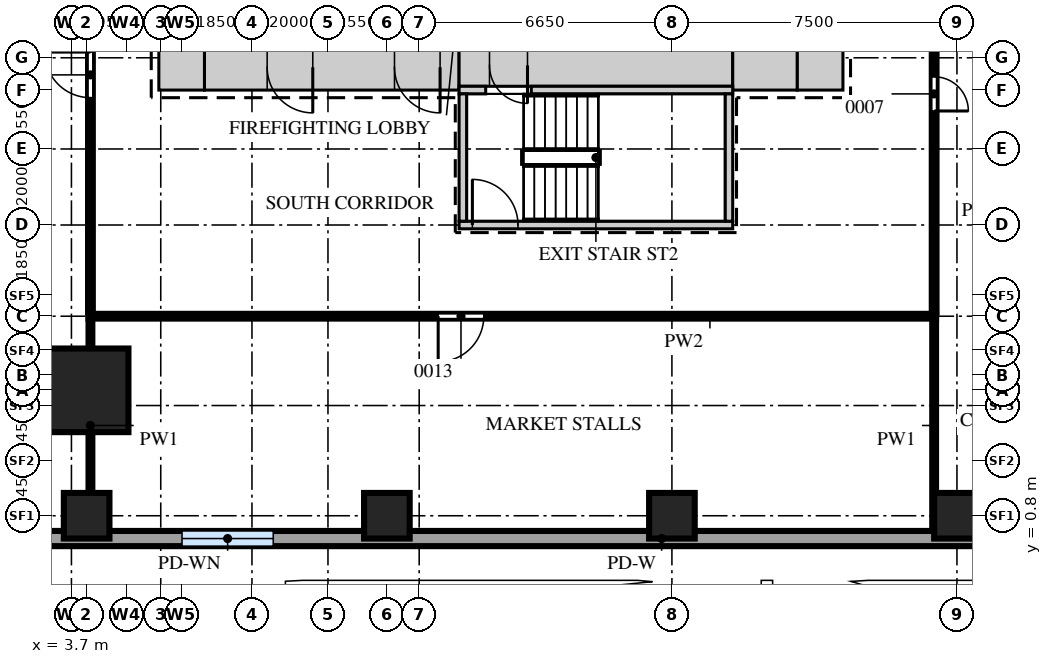
"""IFC4 building model, lengths in metres.
Left out: names, types, materials, properties, quantities, classifications, styles, units other than length and angle.
Written with IfcOpenShell. Run it as: python <this file> out.ifc"""

import sys

from ifc_helpers import new_model, si_unit, direction, frame, frame_2d, origin, origin_2d, place, context, subcontext, project, spatial, rectangle, extrude, source, transform, mapped, element, fill, save


model = new_model("IFC4")
c1 = context("Model", 3, precision=1e-05, world=origin(), true_north=direction((0.0, 1.0)))
c2 = subcontext(c1, "Body", "Model", "MODEL_VIEW")
j1 = project(units=[si_unit("LENGTHUNIT", "METRE"), si_unit("PLANEANGLEUNIT", "RADIAN")], contexts=[c1])
p1 = place(None, origin())
s1 = spatial("IfcSite", under=j1, at=p1, CompositionType="ELEMENT")
p2 = place(p1, origin())
s2 = spatial("IfcBuilding", under=s1, at=p2, CompositionType="ELEMENT")
p3 = place(p2, frame((0.0, 0.0, 7.5)))
s3 = spatial("IfcBuildingStorey", under=s2, at=p3, CompositionType="ELEMENT", Elevation=7.5)
m1 = source(origin(), c2, "Body", "SweptSolid", [
    extrude(rectangle(XDim=6.7, YDim=1.2, at=frame_2d((3.35, 0.0))), origin(), (0.0, 0.0, 1.0), 5.2),
])
p4 = place(p3, frame((7.2, 12.6, 0.0), z_axis=(0.0, 0.0, 1.0), x_axis=(1.0, 0.0, 0.0)))
e1 = element("IfcWall", 1, at=p4, inside=s3, PredefinedType="SHEAR", context=c2, shape_type="MappedRepresentation", body=[
    mapped(m1, transform((0.0, 0.0, 0.0))),
])
m2 = source(origin(), c2, "Body", "SweptSolid", [
    extrude(rectangle(XDim=1.2, YDim=2.1, at=frame_2d((0.6, 1.05))), frame((0.0, 0.61, 0.0), z_axis=(0.0, -1.0, 0.0), x_axis=(1.0, 0.0, 0.0)), (0.0, 0.0, 1.0), 1.22),
])
p5 = place(p4, frame((5.0, 0.0, 0.0)))
e2 = element("IfcOpeningElement", 2, at=p5, cuts=e1, PredefinedType="OPENING", context=c2, shape_type="MappedRepresentation", body=[
    mapped(m2, transform((0.0, 0.0, 0.0))),
])
p6 = place(p4, frame((1.65, 0.0, 0.0)))
e3 = element("IfcOpeningElement", 3, at=p6, cuts=e1, PredefinedType="OPENING", context=c2, shape_type="MappedRepresentation", body=[
    mapped(m2, transform((0.0, 0.0, 0.0))),
])
m3 = source(origin(), c2, "Body", "SweptSolid", [
    extrude(rectangle(XDim=7.2, YDim=1.1, at=frame_2d((3.6, 0.0))), origin(), (0.0, 0.0, 1.0), 5.2),
])
p7 = place(p3, frame((13.9, 12.65, 0.0), z_axis=(0.0, 0.0, 1.0), x_axis=(1.0, 0.0, 0.0)))
e4 = element("IfcWall", 4, at=p7, inside=s3, PredefinedType="SHEAR", context=c2, shape_type="MappedRepresentation", body=[
    mapped(m3, transform((0.0, 0.0, 0.0))),
])
m4 = source(origin(), c2, "Body", "SweptSolid", [
    extrude(rectangle(XDim=1.0, YDim=2.1, at=frame_2d((0.5, 1.05))), frame((0.0, 0.56, 0.0), z_axis=(0.0, -1.0, 0.0), x_axis=(1.0, 0.0, 0.0)), (0.0, 0.0, 1.0), 1.12),
])
p8 = place(p7, frame((0.8, 0.0, 0.0)))
e5 = element("IfcOpeningElement", 5, at=p8, cuts=e4, PredefinedType="OPENING", context=c2, shape_type="MappedRepresentation", body=[
    mapped(m4, transform((0.0, 0.0, 0.0))),
])
m5 = source(origin(), c2, "Body", "SweptSolid", [
    extrude(rectangle(XDim=1.7, YDim=1.2, at=frame_2d((0.85, 0.0))), origin(), (0.0, 0.0, 1.0), 5.2),
])
p9 = place(p3, frame((21.1, 12.6, 0.0), z_axis=(0.0, 0.0, 1.0), x_axis=(1.0, 0.0, 0.0)))
e6 = element("IfcWall", 6, at=p9, inside=s3, PredefinedType="SHEAR", context=c2, shape_type="MappedRepresentation", body=[
    mapped(m5, transform((0.0, 0.0, 0.0))),
])
m6 = source(origin(), c2, "Body", "SweptSolid", [
    extrude(rectangle(XDim=1.2, YDim=1.2, at=frame_2d((0.6, 0.0))), origin(), (0.0, 0.0, 1.0), 5.2),
])
for number, where, z_axis, x_axis in (
    (7, (22.8, 12.6, 0.0), (0.0, 0.0, 1.0), (1.0, 0.0, 0.0)),
    (8, (6.0, 12.6, 0.0), (0.0, 0.0, 1.0), (1.0, 0.0, 0.0)),
):
    element("IfcWall", number, at=place(p3, frame(where, z_axis=z_axis, x_axis=x_axis)), inside=s3, PredefinedType="SHEAR", context=c2, shape_type="MappedRepresentation", body=[
        mapped(m6, transform((0.0, 0.0, 0.0))),
    ])
m7 = source(origin(), c2, "Body", "SweptSolid", [
    extrude(rectangle(XDim=0.7, YDim=0.2, at=frame_2d((0.35, 0.0))), origin(), (0.0, 0.0, 1.0), 5.2),
])
p10 = place(p3, frame((13.9, 12.0, 0.0), z_axis=(0.0, 0.0, 1.0), x_axis=(1.0, 0.0, 0.0)))
e9 = element("IfcWall", 9, at=p10, inside=s3, PredefinedType="SHEAR", context=c2, shape_type="MappedRepresentation", body=[
    mapped(m7, transform((0.0, 0.0, 0.0))),
])
m8 = source(origin(), c2, "Body", "SweptSolid", [
    extrude(rectangle(XDim=5.3, YDim=0.2, at=frame_2d((2.65, 0.0))), origin(), (0.0, 0.0, 1.0), 5.2),
])
p11 = place(p3, frame((15.8, 12.0, 0.0), z_axis=(0.0, 0.0, 1.0), x_axis=(1.0, 0.0, 0.0)))
e10 = element("IfcWall", 10, at=p11, inside=s3, PredefinedType="SHEAR", context=c2, shape_type="MappedRepresentation", body=[
    mapped(m8, transform((0.0, 0.0, 0.0))),
])
m9 = source(origin(), c2, "Body", "SweptSolid", [
    extrude(rectangle(XDim=7.2, YDim=0.2, at=frame_2d((3.6, 0.0))), origin(), (0.0, 0.0, 1.0), 5.2),
])
p12 = place(p3, frame((13.9, 8.45, 0.0), z_axis=(0.0, 0.0, 1.0), x_axis=(1.0, 0.0, 0.0)))
e11 = element("IfcWall", 11, at=p12, inside=s3, PredefinedType="SHEAR", context=c2, shape_type="MappedRepresentation", body=[
    mapped(m9, transform((0.0, 0.0, 0.0))),
])
m10 = source(origin(), c2, "Body", "SweptSolid", [
    extrude(rectangle(XDim=1.2, YDim=2.1, at=frame_2d((0.6, 1.05))), frame((0.0, 0.11, 0.0), z_axis=(0.0, -1.0, 0.0), x_axis=(1.0, 0.0, 0.0)), (0.0, 0.0, 1.0), 0.22),
])
p13 = place(p12, frame((0.35, 0.0, 0.0)))
e12 = element("IfcOpeningElement", 12, at=p13, cuts=e11, PredefinedType="OPENING", context=c2, shape_type="MappedRepresentation", body=[
    mapped(m10, transform((0.0, 0.0, 0.0))),
])
m11 = source(origin(), c2, "Body", "SweptSolid", [
    extrude(rectangle(XDim=3.35, YDim=0.2, at=frame_2d((1.675, 0.0))), origin(), (0.0, 0.0, 1.0), 5.2),
])
for number, where, z_axis, x_axis in (
    (13, (21.0, 8.55, 0.0), (0.0, 0.0, 1.0), (0.0, 1.0, 0.0)),
    (14, (14.0, 8.55, 0.0), (0.0, 0.0, 1.0), (0.0, 1.0, 0.0)),
):
    element("IfcWall", number, at=place(p3, frame(where, z_axis=z_axis, x_axis=x_axis)), inside=s3, PredefinedType="SHEAR", context=c2, shape_type="MappedRepresentation", body=[
        mapped(m11, transform((0.0, 0.0, 0.0))),
    ])
m12 = source(origin(), c2, "Body", "SweptSolid", [
    extrude(rectangle(XDim=2.2, YDim=2.2, at=origin_2d()), origin(), (0.0, 0.0, 1.0), 5.2),
])
p14 = place(p3, frame((4.1, 4.1, 0.0), z_axis=(0.0, 0.0, 1.0), x_axis=(1.0, 0.0, 0.0)))
e15 = element("IfcColumn", 15, at=p14, inside=s3, PredefinedType="COLUMN", context=c2, shape_type="MappedRepresentation", body=[
    mapped(m12, transform((0.0, 0.0, 0.0))),
])
m13 = source(origin(), c2, "Body", "SweptSolid", [
    extrude(rectangle(XDim=1.2, YDim=1.2, at=origin_2d()), origin(), (0.0, 0.0, 1.0), 5.2),
])
for number, where, z_axis, x_axis in (
    (16, (4.1, 0.8, 0.0), (0.0, 0.0, 1.0), (1.0, 0.0, 0.0)),
    (17, (12.0, 0.8, 0.0), (0.0, 0.0, 1.0), (1.0, 0.0, 0.0)),
    (18, (19.5, 0.8, 0.0), (0.0, 0.0, 1.0), (1.0, 0.0, 0.0)),
    (19, (27.0, 0.8, 0.0), (0.0, 0.0, 1.0), (1.0, 0.0, 0.0)),
):
    element("IfcColumn", number, at=place(p3, frame(where, z_axis=z_axis, x_axis=x_axis)), inside=s3, PredefinedType="COLUMN", context=c2, shape_type="MappedRepresentation", body=[
        mapped(m13, transform((0.0, 0.0, 0.0))),
    ])
m14 = source(origin(), c2, "Body", "SweptSolid", [
    extrude(rectangle(XDim=31.24, YDim=0.4, at=frame_2d((15.62, 0.0))), origin(), (0.0, 0.0, 1.0), 5.2),
])
p15 = place(p3, frame((-1.79, 0.2, 0.0), z_axis=(0.0, 0.0, 1.0), x_axis=(1.0, 0.0, 0.0)))
e20 = element("IfcWall", 20, at=p15, inside=s3, PredefinedType="SOLIDWALL", context=c2, shape_type="MappedRepresentation", body=[
    mapped(m14, transform((0.0, 0.0, 0.0))),
])
m15 = source(origin(), c2, "Body", "SweptSolid", [
    extrude(rectangle(XDim=2.4, YDim=2.4, at=frame_2d((1.2, 1.2))), frame((0.0, 0.21, 0.0), z_axis=(0.0, -1.0, 0.0), x_axis=(1.0, 0.0, 0.0)), (0.0, 0.0, 1.0), 0.42),
])
p16 = place(p15, frame((2.4, 0.0, 1.0)))
e21 = element("IfcOpeningElement", 21, at=p16, cuts=e20, PredefinedType="OPENING", context=c2, shape_type="MappedRepresentation", body=[
    mapped(m15, transform((0.0, 0.0, 0.0))),
])
p17 = place(p15, frame((8.4, 0.0, 1.0)))
e22 = element("IfcOpeningElement", 22, at=p17, cuts=e20, PredefinedType="OPENING", context=c2, shape_type="MappedRepresentation", body=[
    mapped(m15, transform((0.0, 0.0, 0.0))),
])
m16 = source(origin(), c2, "Body", "SweptSolid", [
    extrude(rectangle(XDim=5.55, YDim=0.1, at=frame_2d((2.775, 0.0))), origin(), (0.0, 0.0, 1.0), 5.2),
])
for number, where, z_axis, x_axis in (
    (23, (4.2, 0.4, 0.0), (0.0, 0.0, 1.0), (0.0, 1.0, 0.0)),
    (24, (26.4, 0.4, 0.0), (0.0, 0.0, 1.0), (0.0, 1.0, 0.0)),
):
    element("IfcWall", number, at=place(p3, frame(where, z_axis=z_axis, x_axis=x_axis)), inside=s3, PredefinedType="PARTITIONING", context=c2, shape_type="MappedRepresentation", body=[
        mapped(m16, transform((0.0, 0.0, 0.0))),
    ])
m17 = source(origin(), c2, "Body", "SweptSolid", [
    extrude(rectangle(XDim=22.3, YDim=0.125, at=frame_2d((11.15, 0.0))), origin(), (0.0, 0.0, 1.0), 5.2),
])
p18 = place(p3, frame((4.15, 6.05, 0.0), z_axis=(0.0, 0.0, 1.0), x_axis=(1.0, 0.0, 0.0)))
e25 = element("IfcWall", 25, at=p18, inside=s3, PredefinedType="PARTITIONING", context=c2, shape_type="MappedRepresentation", body=[
    mapped(m17, transform((0.0, 0.0, 0.0))),
])
m18 = source(origin(), c2, "Body", "SweptSolid", [
    extrude(rectangle(XDim=1.2, YDim=2.1, at=frame_2d((0.6, 1.05))), frame((0.0, 0.073, 0.0), z_axis=(0.0, -1.0, 0.0), x_axis=(1.0, 0.0, 0.0)), (0.0, 0.0, 1.0), 0.145),
])
p19 = place(p18, frame((9.2, 0.0, 0.0)))
e26 = element("IfcOpeningElement", 26, at=p19, cuts=e25, PredefinedType="OPENING", context=c2, shape_type="MappedRepresentation", body=[
    mapped(m18, transform((0.0, 0.0, 0.0))),
])
m19 = source(origin(), c2, "Body", "SweptSolid", [
    extrude(rectangle(XDim=41.8, YDim=0.125, at=frame_2d((20.9, 0.0))), origin(), (0.0, 0.0, 1.0), 5.2),
])
p20 = place(p3, frame((4.2, 6.15, 0.0), z_axis=(0.0, 0.0, 1.0), x_axis=(0.0, 1.0, 0.0)))
e27 = element("IfcWall", 27, at=p20, inside=s3, PredefinedType="PARTITIONING", context=c2, shape_type="MappedRepresentation", body=[
    mapped(m19, transform((0.0, 0.0, 0.0))),
])
p21 = place(p20, frame((5.65, 0.0, 0.0)))
e28 = element("IfcOpeningElement", 28, at=p21, cuts=e27, PredefinedType="OPENING", context=c2, shape_type="MappedRepresentation", body=[
    mapped(m18, transform((0.0, 0.0, 0.0))),
])
p22 = place(p20, frame((16.5, 0.0, 0.0)))
e29 = element("IfcOpeningElement", 29, at=p22, cuts=e27, PredefinedType="OPENING", context=c2, shape_type="MappedRepresentation", body=[
    mapped(m18, transform((0.0, 0.0, 0.0))),
])
p23 = place(p20, frame((31.05, 0.0, 0.0)))
e30 = element("IfcOpeningElement", 30, at=p23, cuts=e27, PredefinedType="OPENING", context=c2, shape_type="MappedRepresentation", body=[
    mapped(m18, transform((0.0, 0.0, 0.0))),
])
m20 = source(origin(), c2, "Body", "SweptSolid", [
    extrude(rectangle(XDim=27.15, YDim=0.125, at=frame_2d((13.575, 0.0))), origin(), (0.0, 0.0, 1.0), 5.2),
])
p24 = place(p3, frame((26.4, 6.15, 0.0), z_axis=(0.0, 0.0, 1.0), x_axis=(0.0, 1.0, 0.0)))
e31 = element("IfcWall", 31, at=p24, inside=s3, PredefinedType="PARTITIONING", context=c2, shape_type="MappedRepresentation", body=[
    mapped(m20, transform((0.0, 0.0, 0.0))),
])
m21 = source(origin(), c2, "Body", "SweptSolid", [
    extrude(rectangle(XDim=0.9, YDim=2.1, at=frame_2d((0.45, 1.05))), frame((0.0, 0.073, 0.0), z_axis=(0.0, -1.0, 0.0), x_axis=(1.0, 0.0, 0.0)), (0.0, 0.0, 1.0), 0.145),
])
p25 = place(p24, frame((5.3, 0.0, 0.0)))
e32 = element("IfcOpeningElement", 32, at=p25, cuts=e31, PredefinedType="OPENING", context=c2, shape_type="MappedRepresentation", body=[
    mapped(m21, transform((0.0, 0.0, 0.0))),
])
p26 = place(p24, frame((13.25, 0.0, 0.0)))
e33 = element("IfcOpeningElement", 33, at=p26, cuts=e31, PredefinedType="OPENING", context=c2, shape_type="MappedRepresentation", body=[
    mapped(m18, transform((0.0, 0.0, 0.0))),
])
m22 = source(origin(), c2, "Body", "SweptSolid", [
    extrude(rectangle(XDim=2.4, YDim=2.4, at=frame_2d((1.2, 1.2))), frame((0.0, 0.03, 0.0), z_axis=(0.0, -1.0, 0.0), x_axis=(1.0, 0.0, 0.0)), (0.0, 0.0, 1.0), 0.06),
])
p27 = place(p17, origin())
e34 = element("IfcWindow", 34, at=p27, inside=s3, PartitioningType="SINGLE_PANEL", PredefinedType="WINDOW", context=c2, shape_type="MappedRepresentation", body=[
    mapped(m22, transform((0.0, 0.0, 0.0))),
])
fill(e22, e34)
m23 = source(origin(), c2, "Body", "SweptSolid", [
    extrude(rectangle(XDim=1.2, YDim=2.1, at=frame_2d((0.6, 1.05))), frame((0.0, 0.55, 0.0), z_axis=(0.0, -1.0, 0.0), x_axis=(1.0, 0.0, 0.0)), (0.0, 0.0, 1.0), 1.1),
])
p28 = place(p5, origin())
e35 = element("IfcDoor", 35, at=p28, inside=s3, OperationType="SINGLE_SWING_RIGHT", PredefinedType="DOOR", context=c2, shape_type="MappedRepresentation", body=[
    mapped(m23, transform((0.0, 0.0, 0.0))),
])
fill(e2, e35)
p29 = place(p6, origin())
e36 = element("IfcDoor", 36, at=p29, inside=s3, OperationType="SINGLE_SWING_RIGHT", PredefinedType="DOOR", context=c2, shape_type="MappedRepresentation", body=[
    mapped(m23, transform((0.0, 0.0, 0.0))),
])
fill(e3, e36)
m24 = source(origin(), c2, "Body", "SweptSolid", [
    extrude(rectangle(XDim=1.0, YDim=2.1, at=frame_2d((0.5, 1.05))), frame((0.0, 0.5, 0.0), z_axis=(0.0, -1.0, 0.0), x_axis=(1.0, 0.0, 0.0)), (0.0, 0.0, 1.0), 1.0),
])
p30 = place(p8, origin())
e37 = element("IfcDoor", 37, at=p30, inside=s3, OperationType="SINGLE_SWING_RIGHT", PredefinedType="DOOR", context=c2, shape_type="MappedRepresentation", body=[
    mapped(m24, transform((0.0, 0.0, 0.0))),
])
fill(e5, e37)
m25 = source(origin(), c2, "Body", "SweptSolid", [
    extrude(rectangle(XDim=0.9, YDim=2.1, at=frame_2d((0.45, 1.05))), frame((0.0, 0.025, 0.0), z_axis=(0.0, -1.0, 0.0), x_axis=(1.0, 0.0, 0.0)), (0.0, 0.0, 1.0), 0.05),
])
p31 = place(p25, origin())
e38 = element("IfcDoor", 38, at=p31, inside=s3, OperationType="SINGLE_SWING_LEFT", PredefinedType="DOOR", context=c2, shape_type="MappedRepresentation", body=[
    mapped(m25, transform((0.0, 0.0, 0.0))),
])
fill(e32, e38)
m26 = source(origin(), c2, "Body", "SweptSolid", [
    extrude(rectangle(XDim=1.2, YDim=2.1, at=frame_2d((0.6, 1.05))), frame((0.0, 0.025, 0.0), z_axis=(0.0, -1.0, 0.0), x_axis=(1.0, 0.0, 0.0)), (0.0, 0.0, 1.0), 0.05),
])
p32 = place(p19, origin())
e39 = element("IfcDoor", 39, at=p32, inside=s3, OperationType="SINGLE_SWING_LEFT", PredefinedType="DOOR", context=c2, shape_type="MappedRepresentation", body=[
    mapped(m26, transform((0.0, 0.0, 0.0))),
])
fill(e26, e39)
p33 = place(p21, origin())
e40 = element("IfcDoor", 40, at=p33, inside=s3, OperationType="SINGLE_SWING_LEFT", PredefinedType="DOOR", context=c2, shape_type="MappedRepresentation", body=[
    mapped(m26, transform((0.0, 0.0, 0.0))),
])
fill(e28, e40)
p34 = place(p13, origin())
e41 = element("IfcDoor", 41, at=p34, inside=s3, OperationType="SINGLE_SWING_RIGHT", PredefinedType="DOOR", context=c2, shape_type="MappedRepresentation", body=[
    mapped(m26, transform((0.0, 0.0, 0.0))),
])
fill(e12, e41)
save(model, sys.argv[1])
